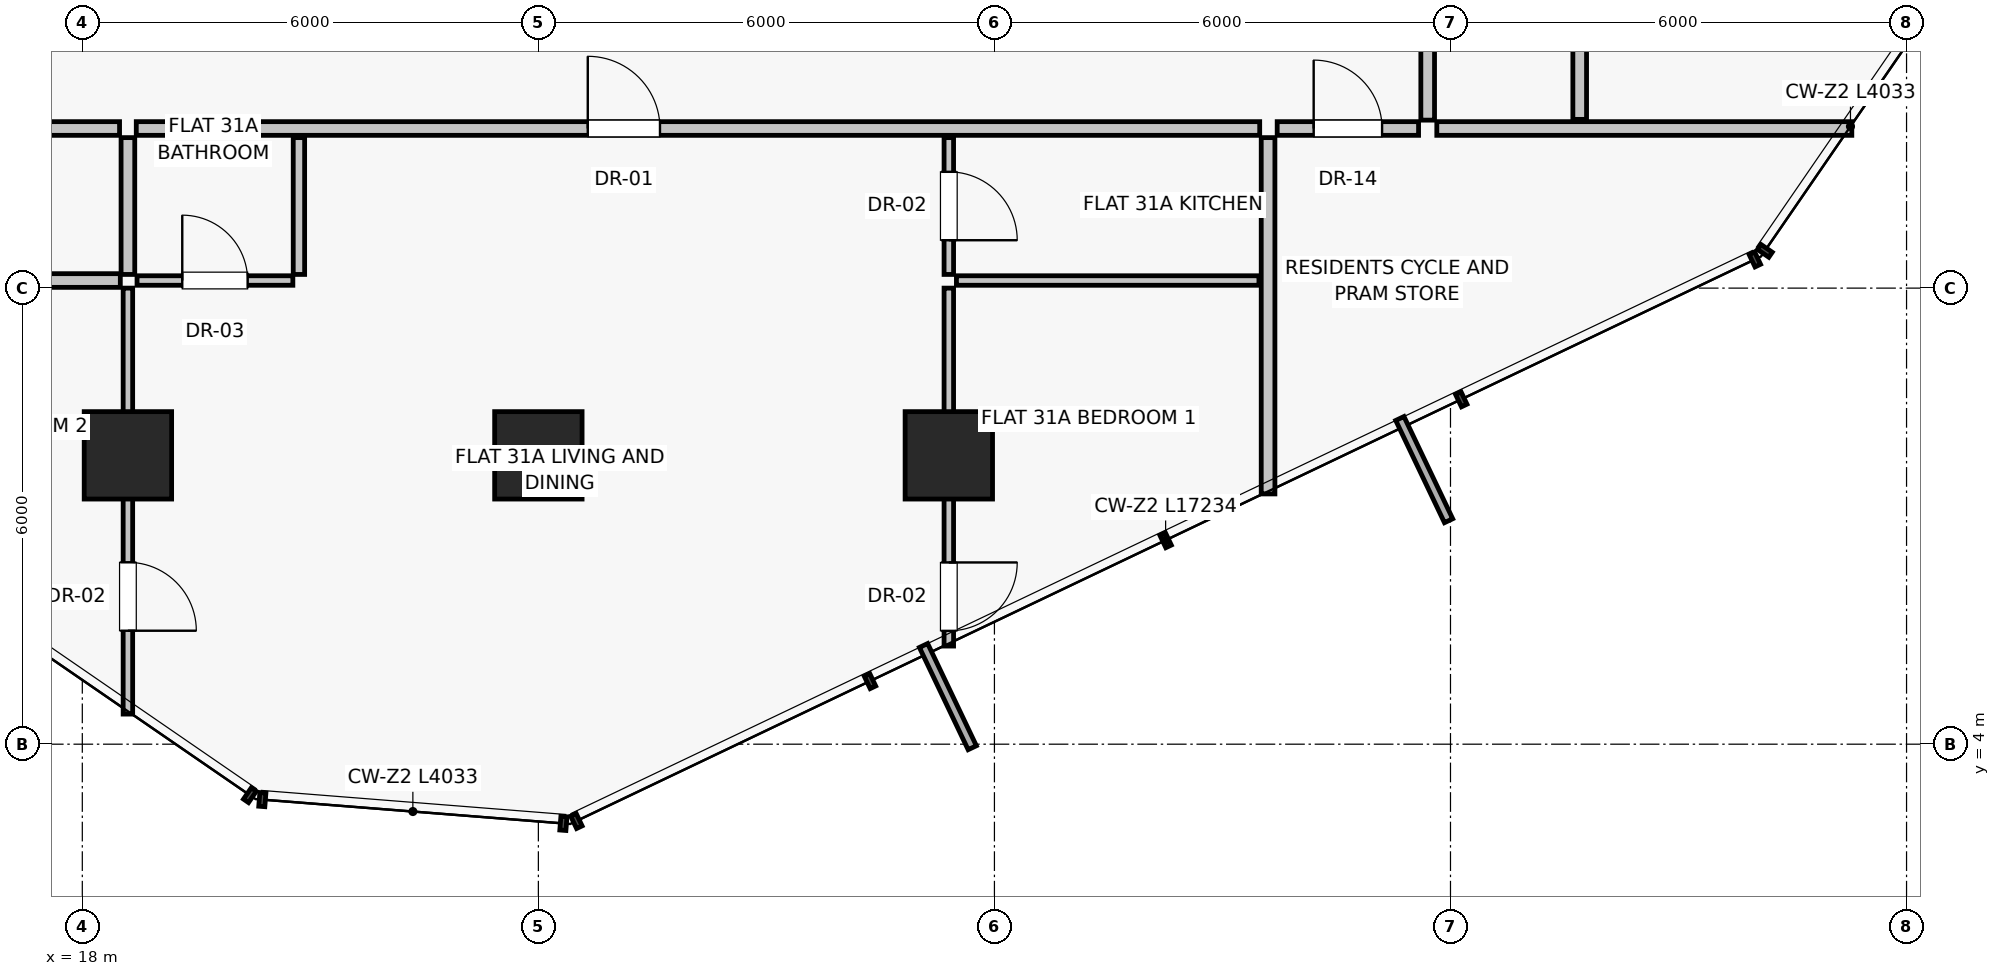
"""IFC4 building model, lengths in metres.
Left out: names, types, materials, properties, quantities, classifications, styles, units other than length and angle.
Written with IfcOpenShell. Run it as: python <this file> out.ifc"""

import sys

from ifc_helpers import new_model, si_unit, direction, frame, frame_2d, origin, origin_2d, place, context, subcontext, project, spatial, rectangle, extrude, source, transform, mapped, element, fill, save


model = new_model("IFC4")
c1 = context("Model", 3, precision=1e-05, world=origin(), true_north=direction((0.0, 1.0)))
c2 = subcontext(c1, "Body", "Model", "MODEL_VIEW")
j1 = project(units=[si_unit("LENGTHUNIT", "METRE"), si_unit("PLANEANGLEUNIT", "RADIAN")], contexts=[c1])
p1 = place(None, origin())
s1 = spatial("IfcSite", under=j1, at=p1, CompositionType="ELEMENT")
p2 = place(p1, origin())
s2 = spatial("IfcBuilding", under=s1, at=p2, CompositionType="ELEMENT")
p3 = place(p2, frame((0.0, 0.0, 113.25)))
s3 = spatial("IfcBuildingStorey", under=s2, at=p3, CompositionType="ELEMENT", Elevation=113.25)
for number, where, z_axis, x_axis in (
    (1, (18.6, 7.8, 0.0), (0.0, 0.0, 1.0), (1.0, 0.0, 0.0)),
    (2, (24.0, 7.8, 0.0), (0.0, 0.0, 1.0), (1.0, 0.0, 0.0)),
    (3, (29.4, 7.8, 0.0), (0.0, 0.0, 1.0), (1.0, 0.0, 0.0)),
):
    element("IfcColumn", number, at=place(p3, frame(where, z_axis=z_axis, x_axis=x_axis)), inside=s3, PredefinedType="COLUMN", context=c2, shape_type="SweptSolid", body=[
        extrude(rectangle(XDim=1.15, YDim=1.15, at=origin_2d()), origin(), (0.0, 0.0, 1.0), 3.25),
    ])
p4 = place(p3, frame((33.6, 11.98, 0.0), z_axis=(0.0, 0.0, 1.0), x_axis=(0.0, -1.0, 0.0)))
e4 = element("IfcWall", 4, at=p4, inside=s3, PredefinedType="PARTITIONING", context=c2, shape_type="SweptSolid", body=[
    extrude(rectangle(XDim=4.688, YDim=0.18, at=frame_2d((2.344, 0.0))), origin(), (0.0, 0.0, 1.0), 3.0),
])
p5 = place(p3, frame((14.51, 12.1, 0.0), z_axis=(0.0, 0.0, 1.0), x_axis=(1.0, 0.0, 0.0)))
e5 = element("IfcWall", 5, at=p5, inside=s3, PredefinedType="PARTITIONING", context=c2, shape_type="SweptSolid", body=[
    extrude(rectangle(XDim=3.98, YDim=0.18, at=frame_2d((1.99, 0.0))), origin(), (0.0, 0.0, 1.0), 2.58),
])
p6 = place(p5, frame((1.49, 0.0, 0.0)))
e6 = element("IfcOpeningElement", 6, at=p6, cuts=e5, PredefinedType="OPENING", context=c2, shape_type="SweptSolid", body=[
    extrude(rectangle(XDim=1.0, YDim=2.01, at=frame_2d((0.5, 1.005))), frame((0.0, 0.1, 0.0), z_axis=(0.0, -1.0, 0.0), x_axis=(1.0, 0.0, 0.0)), (0.0, 0.0, 1.0), 0.2),
])
p7 = place(p3, frame((18.71, 12.1, 0.0), z_axis=(0.0, 0.0, 1.0), x_axis=(1.0, 0.0, 0.0)))
e7 = element("IfcWall", 7, at=p7, inside=s3, PredefinedType="PARTITIONING", context=c2, shape_type="SweptSolid", body=[
    extrude(rectangle(XDim=14.78, YDim=0.18, at=frame_2d((7.39, 0.0))), origin(), (0.0, 0.0, 1.0), 2.58),
])
p8 = place(p7, frame((5.94, 0.0, 0.0)))
e8 = element("IfcOpeningElement", 8, at=p8, cuts=e7, PredefinedType="OPENING", context=c2, shape_type="SweptSolid", body=[
    extrude(rectangle(XDim=0.95, YDim=2.02, at=frame_2d((0.475, 1.01))), frame((0.0, 0.1, 0.0), z_axis=(0.0, -1.0, 0.0), x_axis=(1.0, 0.0, 0.0)), (0.0, 0.0, 1.0), 0.2),
])
p9 = place(p3, frame((14.52, 10.1, 0.0), z_axis=(0.0, 0.0, 1.0), x_axis=(1.0, 0.0, 0.0)))
e9 = element("IfcWall", 9, at=p9, inside=s3, PredefinedType="PARTITIONING", context=c2, shape_type="SweptSolid", body=[
    extrude(rectangle(XDim=3.98, YDim=0.18, at=frame_2d((1.99, 0.0))), origin(), (0.0, 0.0, 1.0), 3.0),
])
p10 = place(p3, frame((18.6, 11.98, 0.0), z_axis=(0.0, 0.0, 1.0), x_axis=(0.0, -1.0, 0.0)))
e10 = element("IfcWall", 10, at=p10, inside=s3, PredefinedType="PARTITIONING", context=c2, shape_type="SweptSolid", body=[
    extrude(rectangle(XDim=1.8, YDim=0.18, at=frame_2d((0.9, 0.0))), origin(), (0.0, 0.0, 1.0), 2.378),
])
p11 = place(p3, frame((18.6, 10.0, 0.0), z_axis=(0.0, 0.0, 1.0), x_axis=(0.0, -1.0, 0.0)))
e11 = element("IfcWall", 11, at=p11, inside=s3, PredefinedType="PARTITIONING", context=c2, shape_type="SweptSolid", body=[
    extrude(rectangle(XDim=5.604, YDim=0.125, at=frame_2d((2.802, 0.0))), origin(), (0.0, 0.0, 1.0), 2.378),
])
p12 = place(p11, frame((3.607, 0.0, 0.0)))
e12 = element("IfcOpeningElement", 12, at=p12, cuts=e11, PredefinedType="OPENING", context=c2, shape_type="SweptSolid", body=[
    extrude(rectangle(XDim=0.9, YDim=2.01, at=frame_2d((0.45, 1.005))), frame((0.0, 0.073, 0.0), z_axis=(0.0, -1.0, 0.0), x_axis=(1.0, 0.0, 0.0)), (0.0, 0.0, 1.0), 0.145),
])
p13 = place(p3, frame((20.85, 11.98, 0.0), z_axis=(0.0, 0.0, 1.0), x_axis=(0.0, -1.0, 0.0)))
e13 = element("IfcWall", 13, at=p13, inside=s3, PredefinedType="PARTITIONING", context=c2, shape_type="SweptSolid", body=[
    extrude(rectangle(XDim=1.8, YDim=0.15, at=frame_2d((0.9, 0.0))), origin(), (0.0, 0.0, 1.0), 3.0),
])
p14 = place(p3, frame((18.72, 10.1, 0.0), z_axis=(0.0, 0.0, 1.0), x_axis=(1.0, 0.0, 0.0)))
e14 = element("IfcWall", 14, at=p14, inside=s3, PredefinedType="PARTITIONING", context=c2, shape_type="SweptSolid", body=[
    extrude(rectangle(XDim=2.05, YDim=0.125, at=frame_2d((1.025, 0.0))), origin(), (0.0, 0.0, 1.0), 3.0),
])
p15 = place(p14, frame((0.595, 0.0, 0.0)))
e15 = element("IfcOpeningElement", 15, at=p15, cuts=e14, PredefinedType="OPENING", context=c2, shape_type="SweptSolid", body=[
    extrude(rectangle(XDim=0.86, YDim=2.01, at=frame_2d((0.43, 1.005))), frame((0.0, 0.073, 0.0), z_axis=(0.0, -1.0, 0.0), x_axis=(1.0, 0.0, 0.0)), (0.0, 0.0, 1.0), 0.145),
])
p16 = place(p3, frame((29.4, 11.98, 0.0), z_axis=(0.0, 0.0, 1.0), x_axis=(0.0, -1.0, 0.0)))
e16 = element("IfcWall", 16, at=p16, inside=s3, PredefinedType="PARTITIONING", context=c2, shape_type="SweptSolid", body=[
    extrude(rectangle(XDim=1.8, YDim=0.125, at=frame_2d((0.9, 0.0))), origin(), (0.0, 0.0, 1.0), 2.378),
])
p17 = place(p16, frame((0.45, 0.0, 0.0)))
e17 = element("IfcOpeningElement", 17, at=p17, cuts=e16, PredefinedType="OPENING", context=c2, shape_type="SweptSolid", body=[
    extrude(rectangle(XDim=0.9, YDim=2.01, at=frame_2d((0.45, 1.005))), frame((0.0, 0.073, 0.0), z_axis=(0.0, -1.0, 0.0), x_axis=(1.0, 0.0, 0.0)), (0.0, 0.0, 1.0), 0.145),
])
p18 = place(p3, frame((29.5, 10.1, 0.0), z_axis=(0.0, 0.0, 1.0), x_axis=(1.0, 0.0, 0.0)))
e18 = element("IfcWall", 18, at=p18, inside=s3, PredefinedType="PARTITIONING", context=c2, shape_type="SweptSolid", body=[
    extrude(rectangle(XDim=3.98, YDim=0.125, at=frame_2d((1.99, 0.0))), origin(), (0.0, 0.0, 1.0), 3.0),
])
p19 = place(p3, frame((29.4, 10.0, 0.0), z_axis=(0.0, 0.0, 1.0), x_axis=(0.0, -1.0, 0.0)))
e19 = element("IfcWall", 19, at=p19, inside=s3, PredefinedType="PARTITIONING", context=c2, shape_type="SweptSolid", body=[
    extrude(rectangle(XDim=4.709, YDim=0.125, at=frame_2d((2.354, 0.0))), origin(), (0.0, 0.0, 1.0), 2.378),
])
p20 = place(p19, frame((3.609, 0.0, 0.0)))
e20 = element("IfcOpeningElement", 20, at=p20, cuts=e19, PredefinedType="OPENING", context=c2, shape_type="SweptSolid", body=[
    extrude(rectangle(XDim=0.9, YDim=2.01, at=frame_2d((0.45, 1.005))), frame((0.0, 0.073, 0.0), z_axis=(0.0, -1.0, 0.0), x_axis=(1.0, 0.0, 0.0)), (0.0, 0.0, 1.0), 0.145),
])
p21 = place(p3, frame((35.82, 12.1, 0.0), z_axis=(0.0, 0.0, 1.0), x_axis=(1.0, 0.0, 0.0)))
e21 = element("IfcWall", 21, at=p21, inside=s3, PredefinedType="PARTITIONING", context=c2, shape_type="SweptSolid", body=[
    extrude(rectangle(XDim=5.46, YDim=0.18, at=frame_2d((2.73, 0.0))), origin(), (0.0, 0.0, 1.0), 3.0),
])
p22 = place(p3, frame((35.7, 12.21, 0.0), z_axis=(0.0, 0.0, 1.0), x_axis=(0.0, 1.0, 0.0)))
e22 = element("IfcWall", 22, at=p22, inside=s3, PredefinedType="PARTITIONING", context=c2, shape_type="SweptSolid", body=[
    extrude(rectangle(XDim=6.28, YDim=0.18, at=frame_2d((3.14, 0.0))), origin(), (0.0, 0.0, 1.0), 2.58),
])
p23 = place(p22, frame((2.64, 0.0, 0.0)))
e23 = element("IfcOpeningElement", 23, at=p23, cuts=e22, PredefinedType="OPENING", context=c2, shape_type="SweptSolid", body=[
    extrude(rectangle(XDim=1.0, YDim=2.01, at=frame_2d((0.5, 1.005))), frame((0.0, 0.1, 0.0), z_axis=(0.0, -1.0, 0.0), x_axis=(1.0, 0.0, 0.0)), (0.0, 0.0, 1.0), 0.2),
])
p24 = place(p3, frame((37.7, 12.22, 0.0), z_axis=(0.0, 0.0, 1.0), x_axis=(0.0, 1.0, 0.0)))
e24 = element("IfcWall", 24, at=p24, inside=s3, PredefinedType="PARTITIONING", context=c2, shape_type="SweptSolid", body=[
    extrude(rectangle(XDim=6.28, YDim=0.18, at=frame_2d((3.14, 0.0))), origin(), (0.0, 0.0, 1.0), 3.0),
])
p25 = place(p3, frame((33.72, 12.1, 0.0), z_axis=(0.0, 0.0, 1.0), x_axis=(1.0, 0.0, 0.0)))
e25 = element("IfcWall", 25, at=p25, inside=s3, PredefinedType="PARTITIONING", context=c2, shape_type="SweptSolid", body=[
    extrude(rectangle(XDim=1.86, YDim=0.18, at=frame_2d((0.93, 0.0))), origin(), (0.0, 0.0, 1.0), 3.0),
])
p26 = place(p25, frame((0.48, 0.0, 0.0)))
e26 = element("IfcOpeningElement", 26, at=p26, cuts=e25, PredefinedType="OPENING", context=c2, shape_type="SweptSolid", body=[
    extrude(rectangle(XDim=0.9, YDim=2.01, at=frame_2d((0.45, 1.005))), frame((0.0, 0.1, 0.0), z_axis=(0.0, -1.0, 0.0), x_axis=(1.0, 0.0, 0.0)), (0.0, 0.0, 1.0), 0.2),
])
m1 = source(origin(), c2, "Body", "SweptSolid", [
    extrude(rectangle(XDim=0.95, YDim=2.02, at=frame_2d((0.475, 1.01))), frame((0.0, 0.025, 0.0), z_axis=(0.0, -1.0, 0.0), x_axis=(1.0, 0.0, 0.0)), (0.0, 0.0, 1.0), 0.05),
])
p27 = place(p8, origin())
e27 = element("IfcDoor", 27, at=p27, inside=s3, OperationType="SINGLE_SWING_LEFT", PredefinedType="DOOR", context=c2, shape_type="MappedRepresentation", body=[
    mapped(m1, transform((0.0, 0.0, 0.0), scale=1.0)),
])
fill(e8, e27)
m2 = source(origin(), c2, "Body", "SweptSolid", [
    extrude(rectangle(XDim=0.9, YDim=2.01, at=frame_2d((0.45, 1.005))), frame((0.0, 0.025, 0.0), z_axis=(0.0, -1.0, 0.0), x_axis=(1.0, 0.0, 0.0)), (0.0, 0.0, 1.0), 0.05),
])
p28 = place(p12, origin())
e28 = element("IfcDoor", 28, at=p28, inside=s3, OperationType="SINGLE_SWING_RIGHT", PredefinedType="DOOR", context=c2, shape_type="MappedRepresentation", body=[
    mapped(m2, transform((0.0, 0.0, 0.0), scale=1.0)),
])
fill(e12, e28)
m3 = source(origin(), c2, "Body", "SweptSolid", [
    extrude(rectangle(XDim=0.86, YDim=2.01, at=frame_2d((0.43, 1.005))), frame((0.0, 0.025, 0.0), z_axis=(0.0, -1.0, 0.0), x_axis=(1.0, 0.0, 0.0)), (0.0, 0.0, 1.0), 0.05),
])
p29 = place(p15, origin())
e29 = element("IfcDoor", 29, at=p29, inside=s3, OperationType="SINGLE_SWING_LEFT", PredefinedType="DOOR", context=c2, shape_type="MappedRepresentation", body=[
    mapped(m3, transform((0.0, 0.0, 0.0), scale=1.0)),
])
fill(e15, e29)
p30 = place(p17, origin())
e30 = element("IfcDoor", 30, at=p30, inside=s3, OperationType="SINGLE_SWING_RIGHT", PredefinedType="DOOR", context=c2, shape_type="MappedRepresentation", body=[
    mapped(m2, transform((0.0, 0.0, 0.0), scale=1.0)),
])
fill(e17, e30)
p31 = place(p20, origin())
e31 = element("IfcDoor", 31, at=p31, inside=s3, OperationType="SINGLE_SWING_LEFT", PredefinedType="DOOR", context=c2, shape_type="MappedRepresentation", body=[
    mapped(m2, transform((0.0, 0.0, 0.0), scale=1.0)),
])
fill(e20, e31)
p32 = place(p26, origin())
e32 = element("IfcDoor", 32, at=p32, inside=s3, OperationType="SINGLE_SWING_LEFT", PredefinedType="DOOR", context=c2, shape_type="MappedRepresentation", body=[
    mapped(m2, transform((0.0, 0.0, 0.0), scale=1.0)),
])
fill(e26, e32)
save(model, sys.argv[1])
